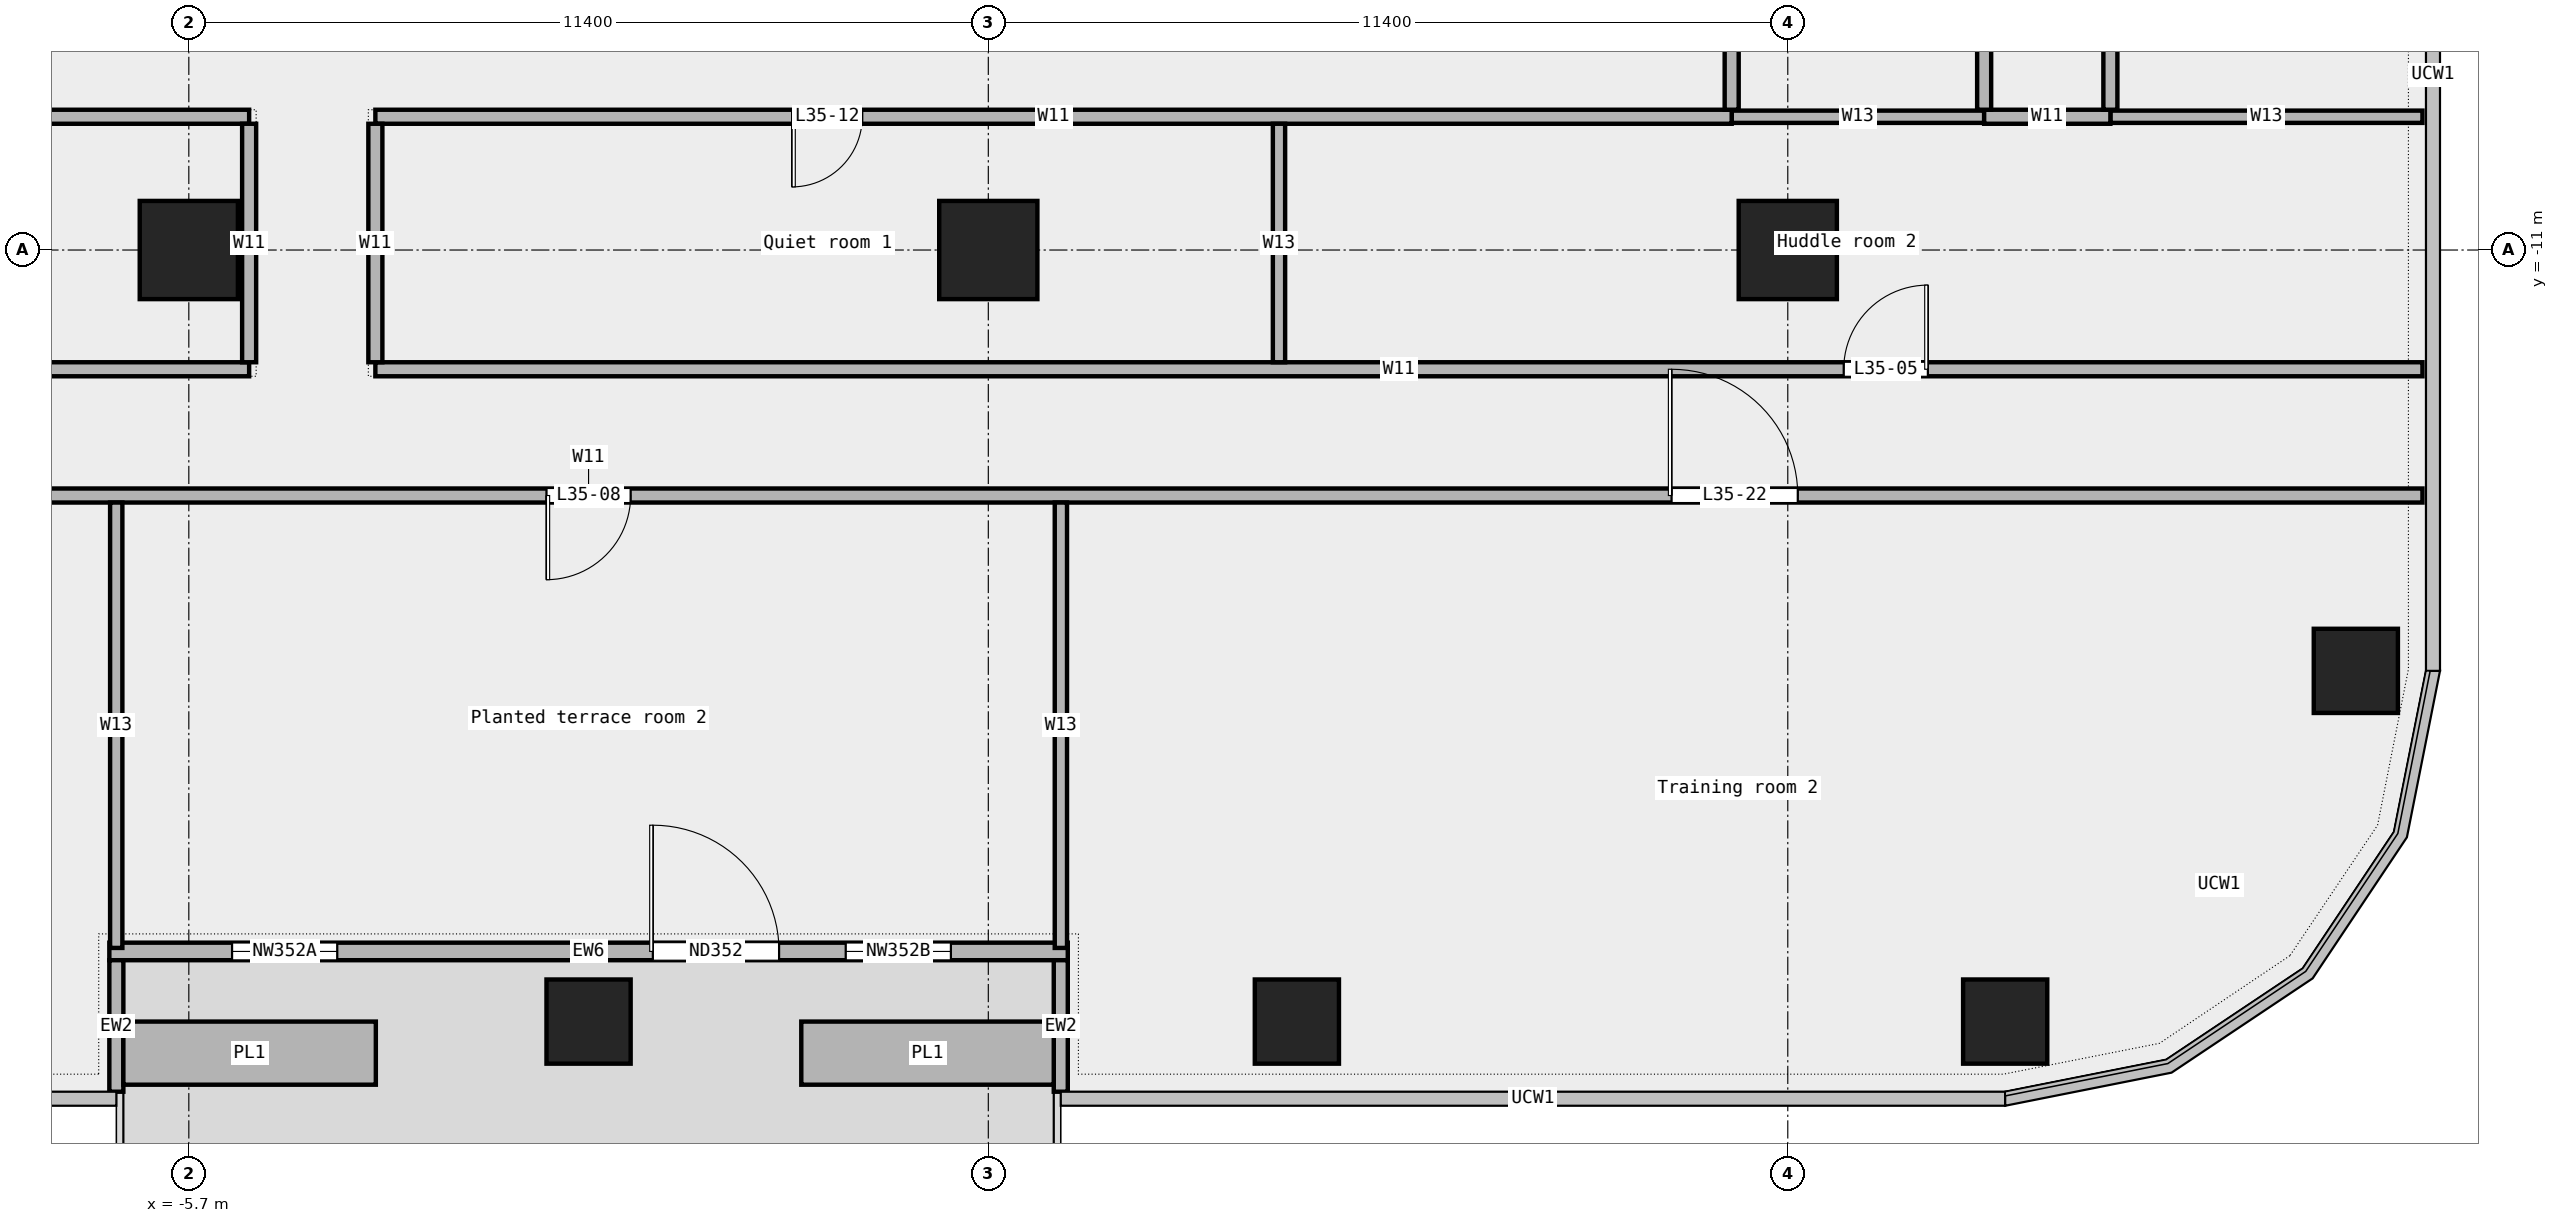
"""IFC4 building model, lengths in metres.
Left out: names, types, materials, properties, quantities, classifications, styles, units other than length and angle.
Written with IfcOpenShell. Run it as: python <this file> out.ifc"""

import sys

from ifc_helpers import new_model, si_unit, direction, frame, frame_2d, origin, origin_2d, place, context, subcontext, project, spatial, rectangle, extrude, element, fill, save


model = new_model("IFC4")
c1 = context("Model", 3, precision=1e-05, world=origin(), true_north=direction((0.0, 1.0)))
c2 = subcontext(c1, "Body", "Model", "MODEL_VIEW")
j1 = project(units=[si_unit("LENGTHUNIT", "METRE"), si_unit("PLANEANGLEUNIT", "RADIAN")], contexts=[c1])
p1 = place(None, origin())
s1 = spatial("IfcSite", under=j1, at=p1, CompositionType="ELEMENT")
p2 = place(p1, origin())
s2 = spatial("IfcBuilding", under=s1, at=p2, CompositionType="ELEMENT")
p3 = place(p2, frame((0.0, 0.0, 173.0)))
s3 = spatial("IfcBuildingStorey", under=s2, at=p3, CompositionType="ELEMENT", Elevation=173.0)
for number, where, z_axis, x_axis in (
    (1, (0.0, -22.0, 0.0), (0.0, 0.0, 1.0), (1.0, 0.0, 0.0)),
    (2, (10.1, -22.0, 0.0), (0.0, 0.0, 1.0), (1.0, 0.0, 0.0)),
    (3, (20.2, -22.0, 0.0), (0.0, 0.0, 1.0), (1.0, 0.0, 0.0)),
    (4, (25.2, -17.0, 0.0), (0.0, 0.0, 1.0), (1.0, 0.0, 0.0)),
):
    element("IfcColumn", number, at=place(p3, frame(where, z_axis=z_axis, x_axis=x_axis)), inside=s3, PredefinedType="COLUMN", context=c2, shape_type="SweptSolid", body=[
        extrude(rectangle(XDim=1.2, YDim=1.2, at=origin_2d()), origin(), (0.0, 0.0, 1.0), 3.6),
    ])
for number, where, z_axis, x_axis in (
    (5, (-5.7, -11.0, 0.0), (0.0, 0.0, 1.0), (1.0, 0.0, 0.0)),
    (6, (5.7, -11.0, 0.0), (0.0, 0.0, 1.0), (1.0, 0.0, 0.0)),
    (7, (17.1, -11.0, 0.0), (0.0, 0.0, 1.0), (1.0, 0.0, 0.0)),
):
    element("IfcColumn", number, at=place(p3, frame(where, z_axis=z_axis, x_axis=x_axis)), inside=s3, PredefinedType="COLUMN", context=c2, shape_type="SweptSolid", body=[
        extrude(rectangle(XDim=1.4, YDim=1.4, at=origin_2d()), origin(), (0.0, 0.0, 1.0), 3.6),
    ])
p4 = place(p3, frame((-6.833, -21.0, 0.0), z_axis=(0.0, 0.0, 1.0), x_axis=(1.0, 0.0, 0.0)))
e8 = element("IfcWall", 8, at=p4, inside=s3, PredefinedType="STANDARD", context=c2, shape_type="SweptSolid", body=[
    extrude(rectangle(XDim=13.667, YDim=0.25, at=frame_2d((6.833, 0.0))), origin(), (0.0, 0.0, 1.0), 3.6),
])
p5 = place(p4, frame((1.75, 0.0, 0.45)))
e9 = element("IfcOpeningElement", 9, at=p5, cuts=e8, PredefinedType="OPENING", context=c2, shape_type="SweptSolid", body=[
    extrude(rectangle(XDim=1.5, YDim=2.4, at=frame_2d((0.75, 1.2))), frame((0.0, 0.137, 0.0), z_axis=(0.0, -1.0, 0.0), x_axis=(1.0, 0.0, 0.0)), (0.0, 0.0, 1.0), 0.274),
])
p6 = place(p4, frame((7.75, 0.0, 0.0)))
e10 = element("IfcOpeningElement", 10, at=p6, cuts=e8, PredefinedType="OPENING", context=c2, shape_type="SweptSolid", body=[
    extrude(rectangle(XDim=1.8, YDim=2.4, at=frame_2d((0.9, 1.2))), frame((0.0, 0.137, 0.0), z_axis=(0.0, -1.0, 0.0), x_axis=(1.0, 0.0, 0.0)), (0.0, 0.0, 1.0), 0.274),
])
p7 = place(p4, frame((10.5, 0.0, 0.45)))
e11 = element("IfcOpeningElement", 11, at=p7, cuts=e8, PredefinedType="OPENING", context=c2, shape_type="SweptSolid", body=[
    extrude(rectangle(XDim=1.5, YDim=2.4, at=frame_2d((0.75, 1.2))), frame((0.0, 0.137, 0.0), z_axis=(0.0, -1.0, 0.0), x_axis=(1.0, 0.0, 0.0)), (0.0, 0.0, 1.0), 0.274),
])
for number, where, z_axis, x_axis in (
    (12, (-6.733, -23.0, 0.0), (0.0, 0.0, 1.0), (0.0, 1.0, 0.0)),
    (13, (6.733, -23.0, 0.0), (0.0, 0.0, 1.0), (0.0, 1.0, 0.0)),
):
    element("IfcWall", number, at=place(p3, frame(where, z_axis=z_axis, x_axis=x_axis)), inside=s3, PredefinedType="STANDARD", context=c2, shape_type="SweptSolid", body=[
        extrude(rectangle(XDim=1.875, YDim=0.2, at=frame_2d((0.938, 0.0))), origin(), (0.0, 0.0, 1.0), 3.6),
    ])
for number, where, z_axis, x_axis in (
    (14, (-6.633, -22.45, 0.0), (0.0, 0.0, 1.0), (1.0, 0.0, 0.0)),
    (15, (3.033, -22.45, 0.0), (0.0, 0.0, 1.0), (1.0, 0.0, 0.0)),
):
    element("IfcWall", number, at=place(p3, frame(where, z_axis=z_axis, x_axis=x_axis)), inside=s3, PredefinedType="STANDARD", context=c2, shape_type="SweptSolid", body=[
        extrude(rectangle(XDim=3.6, YDim=0.9, at=frame_2d((1.8, 0.0))), origin(), (0.0, 0.0, 1.0), 0.7),
    ])
p8 = place(p3, frame((-26.15, -14.5, 0.0), z_axis=(0.0, 0.0, 1.0), x_axis=(1.0, 0.0, 0.0)))
e16 = element("IfcWall", 16, at=p8, inside=s3, PredefinedType="PARTITIONING", context=c2, shape_type="SweptSolid", body=[
    extrude(rectangle(XDim=52.3, YDim=0.2, at=frame_2d((26.15, 0.0))), origin(), (0.0, 0.0, 1.0), 3.6),
])
p9 = place(p8, frame((8.907, 0.0, 0.0)))
e17 = element("IfcOpeningElement", 17, at=p9, cuts=e16, PredefinedType="OPENING", context=c2, shape_type="SweptSolid", body=[
    extrude(rectangle(XDim=1.8, YDim=2.1, at=frame_2d((0.9, 1.05))), frame((0.0, 0.112, 0.0), z_axis=(0.0, -1.0, 0.0), x_axis=(1.0, 0.0, 0.0)), (0.0, 0.0, 1.0), 0.224),
])
p10 = place(p8, frame((25.55, 0.0, 0.0)))
e18 = element("IfcOpeningElement", 18, at=p10, cuts=e16, PredefinedType="OPENING", context=c2, shape_type="SweptSolid", body=[
    extrude(rectangle(XDim=1.2, YDim=2.1, at=frame_2d((0.6, 1.05))), frame((0.0, 0.112, 0.0), z_axis=(0.0, -1.0, 0.0), x_axis=(1.0, 0.0, 0.0)), (0.0, 0.0, 1.0), 0.224),
])
p11 = place(p8, frame((41.593, 0.0, 0.0)))
e19 = element("IfcOpeningElement", 19, at=p11, cuts=e16, PredefinedType="OPENING", context=c2, shape_type="SweptSolid", body=[
    extrude(rectangle(XDim=1.8, YDim=2.1, at=frame_2d((0.9, 1.05))), frame((0.0, 0.112, 0.0), z_axis=(0.0, -1.0, 0.0), x_axis=(1.0, 0.0, 0.0)), (0.0, 0.0, 1.0), 0.224),
])
p12 = place(p3, frame((-26.15, -12.7, 0.0), z_axis=(0.0, 0.0, 1.0), x_axis=(1.0, 0.0, 0.0)))
e20 = element("IfcWall", 20, at=p12, inside=s3, PredefinedType="PARTITIONING", context=c2, shape_type="SweptSolid", body=[
    extrude(rectangle(XDim=21.31, YDim=0.2, at=frame_2d((10.655, 0.0))), origin(), (0.0, 0.0, 1.0), 3.6),
])
p13 = place(p12, frame((3.597, 0.0, 0.0)))
e21 = element("IfcOpeningElement", 21, at=p13, cuts=e20, PredefinedType="OPENING", context=c2, shape_type="SweptSolid", body=[
    extrude(rectangle(XDim=0.9, YDim=2.1, at=frame_2d((0.45, 1.05))), frame((0.0, 0.112, 0.0), z_axis=(0.0, -1.0, 0.0), x_axis=(1.0, 0.0, 0.0)), (0.0, 0.0, 1.0), 0.224),
])
p14 = place(p12, frame((14.002, 0.0, 0.0)))
e22 = element("IfcOpeningElement", 22, at=p14, cuts=e20, PredefinedType="OPENING", context=c2, shape_type="SweptSolid", body=[
    extrude(rectangle(XDim=1.2, YDim=2.1, at=frame_2d((0.6, 1.05))), frame((0.0, 0.112, 0.0), z_axis=(0.0, -1.0, 0.0), x_axis=(1.0, 0.0, 0.0)), (0.0, 0.0, 1.0), 0.224),
])
p15 = place(p3, frame((-3.04, -12.7, 0.0), z_axis=(0.0, 0.0, 1.0), x_axis=(1.0, 0.0, 0.0)))
e23 = element("IfcWall", 23, at=p15, inside=s3, PredefinedType="PARTITIONING", context=c2, shape_type="SweptSolid", body=[
    extrude(rectangle(XDim=29.19, YDim=0.2, at=frame_2d((14.595, 0.0))), origin(), (0.0, 0.0, 1.0), 3.6),
])
p16 = place(p15, frame((20.938, 0.0, 0.0)))
e24 = element("IfcOpeningElement", 24, at=p16, cuts=e23, PredefinedType="OPENING", context=c2, shape_type="SweptSolid", body=[
    extrude(rectangle(XDim=1.2, YDim=2.1, at=frame_2d((0.6, 1.05))), frame((0.0, 0.112, 0.0), z_axis=(0.0, -1.0, 0.0), x_axis=(1.0, 0.0, 0.0)), (0.0, 0.0, 1.0), 0.224),
])
p17 = place(p3, frame((16.3, -9.1, 0.0), z_axis=(0.0, 0.0, 1.0), x_axis=(1.0, 0.0, 0.0)))
e25 = element("IfcWall", 25, at=p17, inside=s3, PredefinedType="PARTITIONING", context=c2, shape_type="SweptSolid", body=[
    extrude(rectangle(XDim=3.6, YDim=0.175, at=frame_2d((1.8, 0.0))), origin(), (0.0, 0.0, 1.0), 3.6),
])
p18 = place(p3, frame((21.7, -9.1, 0.0), z_axis=(0.0, 0.0, 1.0), x_axis=(1.0, 0.0, 0.0)))
e26 = element("IfcWall", 26, at=p18, inside=s3, PredefinedType="PARTITIONING", context=c2, shape_type="SweptSolid", body=[
    extrude(rectangle(XDim=4.45, YDim=0.175, at=frame_2d((2.225, 0.0))), origin(), (0.0, 0.0, 1.0), 3.6),
])
p19 = place(p3, frame((-16.3, -9.1, 0.0), z_axis=(0.0, 0.0, 1.0), x_axis=(1.0, 0.0, 0.0)))
e27 = element("IfcWall", 27, at=p19, inside=s3, PredefinedType="PARTITIONING", context=c2, shape_type="SweptSolid", body=[
    extrude(rectangle(XDim=11.46, YDim=0.2, at=frame_2d((5.73, 0.0))), origin(), (0.0, 0.0, 1.0), 3.6),
])
p20 = place(p3, frame((-3.04, -9.1, 0.0), z_axis=(0.0, 0.0, 1.0), x_axis=(1.0, 0.0, 0.0)))
e28 = element("IfcWall", 28, at=p20, inside=s3, PredefinedType="PARTITIONING", context=c2, shape_type="SweptSolid", body=[
    extrude(rectangle(XDim=19.34, YDim=0.2, at=frame_2d((9.67, 0.0))), origin(), (0.0, 0.0, 1.0), 3.6),
])
p21 = place(p20, frame((5.942, 0.0, 0.0)))
e29 = element("IfcOpeningElement", 29, at=p21, cuts=e28, PredefinedType="OPENING", context=c2, shape_type="SweptSolid", body=[
    extrude(rectangle(XDim=1.0, YDim=2.1, at=frame_2d((0.5, 1.05))), frame((0.0, 0.112, 0.0), z_axis=(0.0, -1.0, 0.0), x_axis=(1.0, 0.0, 0.0)), (0.0, 0.0, 1.0), 0.224),
])
p22 = place(p3, frame((19.9, -9.1, 0.0), z_axis=(0.0, 0.0, 1.0), x_axis=(1.0, 0.0, 0.0)))
e30 = element("IfcWall", 30, at=p22, inside=s3, PredefinedType="PARTITIONING", context=c2, shape_type="SweptSolid", body=[
    extrude(rectangle(XDim=1.8, YDim=0.2, at=frame_2d((0.9, 0.0))), origin(), (0.0, 0.0, 1.0), 3.6),
])
p23 = place(p3, frame((-6.735, -20.95, 0.0), z_axis=(0.0, 0.0, 1.0), x_axis=(0.0, 1.0, 0.0)))
e31 = element("IfcWall", 31, at=p23, inside=s3, PredefinedType="PARTITIONING", context=c2, shape_type="SweptSolid", body=[
    extrude(rectangle(XDim=6.35, YDim=0.175, at=frame_2d((3.175, 0.0))), origin(), (0.0, 0.0, 1.0), 3.6),
])
for number, where, z_axis, x_axis in (
    (32, (-4.84, -12.6, 0.0), (0.0, 0.0, 1.0), (0.0, 1.0, 0.0)),
    (33, (-3.04, -12.6, 0.0), (0.0, 0.0, 1.0), (0.0, 1.0, 0.0)),
):
    element("IfcWall", number, at=place(p3, frame(where, z_axis=z_axis, x_axis=x_axis)), inside=s3, PredefinedType="PARTITIONING", context=c2, shape_type="SweptSolid", body=[
        extrude(rectangle(XDim=3.4, YDim=0.2, at=frame_2d((1.7, 0.0))), origin(), (0.0, 0.0, 1.0), 3.6),
    ])
p24 = place(p3, frame((6.735, -20.95, 0.0), z_axis=(0.0, 0.0, 1.0), x_axis=(0.0, 1.0, 0.0)))
e34 = element("IfcWall", 34, at=p24, inside=s3, PredefinedType="PARTITIONING", context=c2, shape_type="SweptSolid", body=[
    extrude(rectangle(XDim=6.35, YDim=0.175, at=frame_2d((3.175, 0.0))), origin(), (0.0, 0.0, 1.0), 3.6),
])
p25 = place(p3, frame((9.845, -12.6, 0.0), z_axis=(0.0, 0.0, 1.0), x_axis=(0.0, 1.0, 0.0)))
e35 = element("IfcWall", 35, at=p25, inside=s3, PredefinedType="PARTITIONING", context=c2, shape_type="SweptSolid", body=[
    extrude(rectangle(XDim=3.4, YDim=0.175, at=frame_2d((1.7, 0.0))), origin(), (0.0, 0.0, 1.0), 3.6),
])
p26 = place(p3, frame((16.3, -9.0, 0.0), z_axis=(0.0, 0.0, 1.0), x_axis=(0.0, 1.0, 0.0)))
e36 = element("IfcWall", 36, at=p26, inside=s3, PredefinedType="PARTITIONING", context=c2, shape_type="SweptSolid", body=[
    extrude(rectangle(XDim=6.25, YDim=0.2, at=frame_2d((3.125, 0.0))), origin(), (0.0, 0.0, 1.0), 3.6),
])
p27 = place(p3, frame((19.9, -9.0, 0.0), z_axis=(0.0, 0.0, 1.0), x_axis=(0.0, 1.0, 0.0)))
e37 = element("IfcWall", 37, at=p27, inside=s3, PredefinedType="PARTITIONING", context=c2, shape_type="SweptSolid", body=[
    extrude(rectangle(XDim=6.25, YDim=0.2, at=frame_2d((3.125, 0.0))), origin(), (0.0, 0.0, 1.0), 3.6),
])
p28 = place(p27, frame((2.675, 0.0, 0.0)))
e38 = element("IfcOpeningElement", 38, at=p28, cuts=e37, PredefinedType="OPENING", context=c2, shape_type="SweptSolid", body=[
    extrude(rectangle(XDim=0.9, YDim=2.1, at=frame_2d((0.45, 1.05))), frame((0.0, 0.112, 0.0), z_axis=(0.0, -1.0, 0.0), x_axis=(1.0, 0.0, 0.0)), (0.0, 0.0, 1.0), 0.224),
])
p29 = place(p3, frame((21.7, -9.0, 0.0), z_axis=(0.0, 0.0, 1.0), x_axis=(0.0, 1.0, 0.0)))
e39 = element("IfcWall", 39, at=p29, inside=s3, PredefinedType="PARTITIONING", context=c2, shape_type="SweptSolid", body=[
    extrude(rectangle(XDim=24.3, YDim=0.2, at=frame_2d((12.15, 0.0))), origin(), (0.0, 0.0, 1.0), 3.6),
])
p30 = place(p29, frame((3.583, 0.0, 0.0)))
e40 = element("IfcOpeningElement", 40, at=p30, cuts=e39, PredefinedType="OPENING", context=c2, shape_type="SweptSolid", body=[
    extrude(rectangle(XDim=0.9, YDim=2.1, at=frame_2d((0.45, 1.05))), frame((0.0, 0.112, 0.0), z_axis=(0.0, -1.0, 0.0), x_axis=(1.0, 0.0, 0.0)), (0.0, 0.0, 1.0), 0.224),
])
p31 = place(p29, frame((22.575, 0.0, 0.0)))
e41 = element("IfcOpeningElement", 41, at=p31, cuts=e39, PredefinedType="OPENING", context=c2, shape_type="SweptSolid", body=[
    extrude(rectangle(XDim=0.9, YDim=2.1, at=frame_2d((0.45, 1.05))), frame((0.0, 0.112, 0.0), z_axis=(0.0, -1.0, 0.0), x_axis=(1.0, 0.0, 0.0)), (0.0, 0.0, 1.0), 0.224),
])
p32 = place(p29, frame((14.925, 0.0, 0.0)))
e42 = element("IfcOpeningElement", 42, at=p32, cuts=e39, PredefinedType="OPENING", context=c2, shape_type="SweptSolid", body=[
    extrude(rectangle(XDim=0.9, YDim=2.1, at=frame_2d((0.45, 1.05))), frame((0.0, 0.112, 0.0), z_axis=(0.0, -1.0, 0.0), x_axis=(1.0, 0.0, 0.0)), (0.0, 0.0, 1.0), 0.224),
])
p33 = place(p5, origin())
e43 = element("IfcWindow", 43, at=p33, inside=s3, PartitioningType="SINGLE_PANEL", PredefinedType="WINDOW", context=c2, shape_type="SweptSolid", body=[
    extrude(rectangle(XDim=1.5, YDim=2.4, at=frame_2d((0.75, 1.2))), frame((0.0, 0.03, 0.0), z_axis=(0.0, -1.0, 0.0), x_axis=(1.0, 0.0, 0.0)), (0.0, 0.0, 1.0), 0.06),
])
fill(e9, e43)
p34 = place(p6, origin())
e44 = element("IfcDoor", 44, at=p34, inside=s3, OperationType="DOUBLE_DOOR_SINGLE_SWING", PredefinedType="DOOR", context=c2, shape_type="SweptSolid", body=[
    extrude(rectangle(XDim=1.8, YDim=2.4, at=frame_2d((0.9, 1.2))), frame((0.0, 0.025, 0.0), z_axis=(0.0, -1.0, 0.0), x_axis=(1.0, 0.0, 0.0)), (0.0, 0.0, 1.0), 0.05),
])
fill(e10, e44)
p35 = place(p7, origin())
e45 = element("IfcWindow", 45, at=p35, inside=s3, PartitioningType="SINGLE_PANEL", PredefinedType="WINDOW", context=c2, shape_type="SweptSolid", body=[
    extrude(rectangle(XDim=1.5, YDim=2.4, at=frame_2d((0.75, 1.2))), frame((0.0, 0.03, 0.0), z_axis=(0.0, -1.0, 0.0), x_axis=(1.0, 0.0, 0.0)), (0.0, 0.0, 1.0), 0.06),
])
fill(e11, e45)
p36 = place(p16, origin())
e46 = element("IfcDoor", 46, at=p36, inside=s3, OperationType="SINGLE_SWING_RIGHT", PredefinedType="DOOR", context=c2, shape_type="SweptSolid", body=[
    extrude(rectangle(XDim=1.2, YDim=2.1, at=frame_2d((0.6, 1.05))), frame((0.0, 0.025, 0.0), z_axis=(0.0, -1.0, 0.0), x_axis=(1.0, 0.0, 0.0)), (0.0, 0.0, 1.0), 0.05),
])
fill(e24, e46)
p37 = place(p10, origin())
e47 = element("IfcDoor", 47, at=p37, inside=s3, OperationType="SINGLE_SWING_RIGHT", PredefinedType="DOOR", context=c2, shape_type="SweptSolid", body=[
    extrude(rectangle(XDim=1.2, YDim=2.1, at=frame_2d((0.6, 1.05))), frame((0.0, 0.025, 0.0), z_axis=(0.0, -1.0, 0.0), x_axis=(1.0, 0.0, 0.0)), (0.0, 0.0, 1.0), 0.05),
])
fill(e18, e47)
p38 = place(p21, origin())
e48 = element("IfcDoor", 48, at=p38, inside=s3, OperationType="SINGLE_SWING_RIGHT", PredefinedType="DOOR", context=c2, shape_type="SweptSolid", body=[
    extrude(rectangle(XDim=1.0, YDim=2.1, at=frame_2d((0.5, 1.05))), frame((0.0, 0.025, 0.0), z_axis=(0.0, -1.0, 0.0), x_axis=(1.0, 0.0, 0.0)), (0.0, 0.0, 1.0), 0.05),
])
fill(e29, e48)
p39 = place(p11, origin())
e49 = element("IfcDoor", 49, at=p39, inside=s3, OperationType="DOUBLE_DOOR_SINGLE_SWING", PredefinedType="DOOR", context=c2, shape_type="SweptSolid", body=[
    extrude(rectangle(XDim=1.8, YDim=2.1, at=frame_2d((0.9, 1.05))), frame((0.0, 0.025, 0.0), z_axis=(0.0, -1.0, 0.0), x_axis=(1.0, 0.0, 0.0)), (0.0, 0.0, 1.0), 0.05),
])
fill(e19, e49)
save(model, sys.argv[1])
